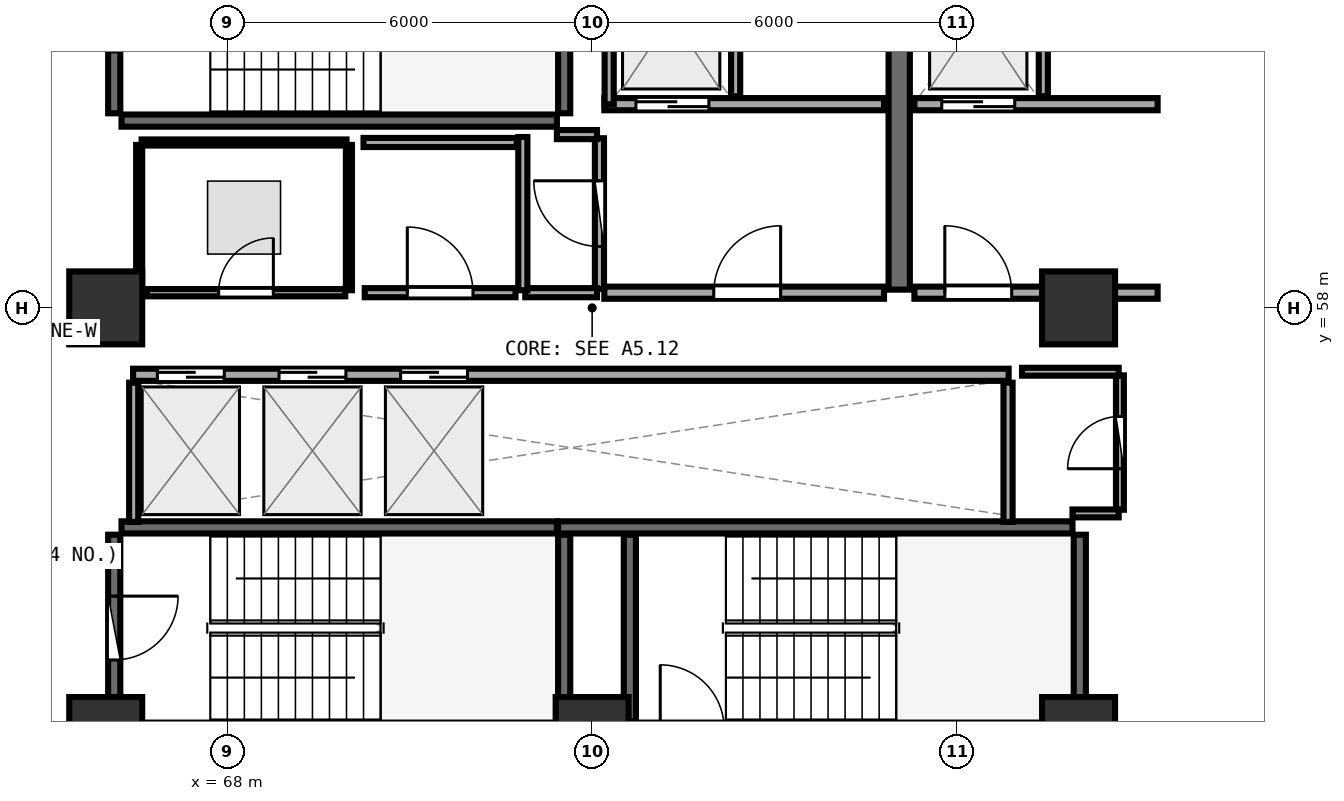
"""IFC4 building model, lengths in metres.
Left out: names, types, materials, properties, quantities, classifications, styles, units other than length and angle.
Written with IfcOpenShell. Run it as: python <this file> out.ifc"""

import sys

from ifc_helpers import new_model, si_unit, direction, frame, frame_2d, origin, origin_2d, place, context, subcontext, project, spatial, rectangle, extrude, element, fill, save


model = new_model("IFC4")
c1 = context("Model", 3, precision=1e-05, world=origin(), true_north=direction((0.0, 1.0)))
c2 = subcontext(c1, "Body", "Model", "MODEL_VIEW")
j1 = project(units=[si_unit("LENGTHUNIT", "METRE"), si_unit("PLANEANGLEUNIT", "RADIAN")], contexts=[c1])
p1 = place(None, origin())
s1 = spatial("IfcSite", under=j1, at=p1, CompositionType="ELEMENT")
p2 = place(p1, origin())
s2 = spatial("IfcBuilding", under=s1, at=p2, CompositionType="ELEMENT")
p3 = place(p2, frame((0.0, 0.0, 150.6)))
s3 = spatial("IfcBuildingStorey", under=s2, at=p3, CompositionType="ELEMENT", Elevation=150.6)
for number, where, z_axis, x_axis in (
    (1, (66.0, 51.0, 0.0), (0.0, 0.0, 1.0), (1.0, 0.0, 0.0)),
    (2, (74.0, 51.0, 0.0), (0.0, 0.0, 1.0), (1.0, 0.0, 0.0)),
    (3, (82.0, 51.0, 0.0), (0.0, 0.0, 1.0), (1.0, 0.0, 0.0)),
    (4, (82.0, 58.0, 0.0), (0.0, 0.0, 1.0), (1.0, 0.0, 0.0)),
    (5, (66.0, 58.0, 0.0), (0.0, 0.0, 1.0), (1.0, 0.0, 0.0)),
):
    element("IfcColumn", number, at=place(p3, frame(where, z_axis=z_axis, x_axis=x_axis)), inside=s3, PredefinedType="PILASTER", context=c2, shape_type="SweptSolid", body=[
        extrude(rectangle(XDim=1.2, YDim=1.2, at=origin_2d()), origin(), (0.0, 0.0, 1.0), 3.75),
    ])
p4 = place(p3, frame((66.26, 61.08, 0.0), z_axis=(0.0, 0.0, 1.0), x_axis=(1.0, 0.0, 0.0)))
e6 = element("IfcWall", 6, at=p4, inside=s3, PredefinedType="SHEAR", context=c2, shape_type="SweptSolid", body=[
    extrude(rectangle(XDim=7.16, YDim=0.2, at=frame_2d((3.58, 0.0))), origin(), (0.0, 0.0, 1.0), 3.49),
])
p5 = place(p3, frame((73.54, 61.2, 0.0), z_axis=(0.0, 0.0, 1.0), x_axis=(0.0, 1.0, 0.0)))
e7 = element("IfcWall", 7, at=p5, inside=s3, PredefinedType="SHEAR", context=c2, shape_type="SweptSolid", body=[
    extrude(rectangle(XDim=3.07, YDim=0.2, at=frame_2d((1.535, 0.0))), origin(), (0.0, 0.0, 1.0), 3.49),
])
p6 = place(p3, frame((66.14, 64.27, 0.0), z_axis=(0.0, 0.0, 1.0), x_axis=(0.0, -1.0, 0.0)))
e8 = element("IfcWall", 8, at=p6, inside=s3, PredefinedType="SHEAR", context=c2, shape_type="SweptSolid", body=[
    extrude(rectangle(XDim=3.07, YDim=0.2, at=frame_2d((1.535, 0.0))), origin(), (0.0, 0.0, 1.0), 3.49),
])
p7 = place(p6, frame((1.01, 0.0, 0.0)))
e9 = element("IfcOpeningElement", 9, at=p7, cuts=e8, PredefinedType="OPENING", context=c2, shape_type="SweptSolid", body=[
    extrude(rectangle(XDim=1.05, YDim=2.1, at=frame_2d((0.525, 1.05))), frame((0.0, 0.11, 0.0), z_axis=(0.0, -1.0, 0.0), x_axis=(1.0, 0.0, 0.0)), (0.0, 0.0, 1.0), 0.22),
])
p8 = place(p3, frame((82.02, 51.2, 0.0), z_axis=(0.0, 0.0, 1.0), x_axis=(0.0, 1.0, 0.0)))
e10 = element("IfcWall", 10, at=p8, inside=s3, PredefinedType="SHEAR", context=c2, shape_type="SweptSolid", body=[
    extrude(rectangle(XDim=3.07, YDim=0.2, at=frame_2d((1.535, 0.0))), origin(), (0.0, 0.0, 1.0), 3.49),
])
p9 = place(p3, frame((81.9, 54.39, 0.0), z_axis=(0.0, 0.0, 1.0), x_axis=(-1.0, 0.0, 0.0)))
e11 = element("IfcWall", 11, at=p9, inside=s3, PredefinedType="SHEAR", context=c2, shape_type="SweptSolid", body=[
    extrude(rectangle(XDim=8.46, YDim=0.2, at=frame_2d((4.23, 0.0))), origin(), (0.0, 0.0, 1.0), 3.49),
])
for number, where, z_axis, x_axis in (
    (12, (74.62, 54.27, 0.0), (0.0, 0.0, 1.0), (0.0, -1.0, 0.0)),
    (13, (73.54, 51.2, 0.0), (0.0, 0.0, 1.0), (0.0, 1.0, 0.0)),
):
    element("IfcWall", number, at=place(p3, frame(where, z_axis=z_axis, x_axis=x_axis)), inside=s3, PredefinedType="SHEAR", context=c2, shape_type="SweptSolid", body=[
        extrude(rectangle(XDim=3.07, YDim=0.2, at=frame_2d((1.535, 0.0))), origin(), (0.0, 0.0, 1.0), 3.49),
    ])
p10 = place(p3, frame((73.42, 54.39, 0.0), z_axis=(0.0, 0.0, 1.0), x_axis=(-1.0, 0.0, 0.0)))
e14 = element("IfcWall", 14, at=p10, inside=s3, PredefinedType="SHEAR", context=c2, shape_type="SweptSolid", body=[
    extrude(rectangle(XDim=7.16, YDim=0.2, at=frame_2d((3.58, 0.0))), origin(), (0.0, 0.0, 1.0), 3.49),
])
p11 = place(p3, frame((66.14, 54.27, 0.0), z_axis=(0.0, 0.0, 1.0), x_axis=(0.0, -1.0, 0.0)))
e15 = element("IfcWall", 15, at=p11, inside=s3, PredefinedType="SHEAR", context=c2, shape_type="SweptSolid", body=[
    extrude(rectangle(XDim=3.07, YDim=0.2, at=frame_2d((1.535, 0.0))), origin(), (0.0, 0.0, 1.0), 3.49),
])
p12 = place(p11, frame((1.01, 0.0, 0.0)))
e16 = element("IfcOpeningElement", 16, at=p12, cuts=e15, PredefinedType="OPENING", context=c2, shape_type="SweptSolid", body=[
    extrude(rectangle(XDim=1.05, YDim=2.1, at=frame_2d((0.525, 1.05))), frame((0.0, 0.11, 0.0), z_axis=(0.0, -1.0, 0.0), x_axis=(1.0, 0.0, 0.0)), (0.0, 0.0, 1.0), 0.22),
])
p13 = place(p3, frame((79.05, 58.3, 0.0), z_axis=(0.0, 0.0, 1.0), x_axis=(0.0, 1.0, 0.0)))
e17 = element("IfcWall", 17, at=p13, inside=s3, PredefinedType="SHEAR", context=c2, shape_type="SweptSolid", body=[
    extrude(rectangle(XDim=6.3, YDim=0.35, at=frame_2d((3.15, 0.0))), origin(), (0.0, 0.0, 1.0), 3.49),
])
p14 = place(p3, frame((74.2, 61.35, 0.0), z_axis=(0.0, 0.0, 1.0), x_axis=(1.0, 0.0, 0.0)))
e18 = element("IfcWall", 18, at=p14, inside=s3, PredefinedType="SOLIDWALL", context=c2, shape_type="SweptSolid", body=[
    extrude(rectangle(XDim=4.6, YDim=0.2, at=frame_2d((2.3, 0.0))), origin(), (0.0, 0.0, 1.0), 3.48),
])
p15 = place(p14, frame((0.52, 0.0, 0.0)))
e19 = element("IfcOpeningElement", 19, at=p15, cuts=e18, PredefinedType="OPENING", context=c2, shape_type="SweptSolid", body=[
    extrude(rectangle(XDim=1.2, YDim=2.15, at=frame_2d((0.6, 1.075))), frame((0.0, 0.11, 0.0), z_axis=(0.0, -1.0, 0.0), x_axis=(1.0, 0.0, 0.0)), (0.0, 0.0, 1.0), 0.22),
])
p16 = place(p3, frame((74.28, 61.35, 0.0), z_axis=(0.0, 0.0, 1.0), x_axis=(0.0, 1.0, 0.0)))
e20 = element("IfcWall", 20, at=p16, inside=s3, PredefinedType="PARTITIONING", context=c2, shape_type="SweptSolid", body=[
    extrude(rectangle(XDim=2.97, YDim=0.15, at=frame_2d((1.485, 0.0))), origin(), (0.0, 0.0, 1.0), 3.48),
])
p17 = place(p3, frame((76.36, 61.48, 0.0), z_axis=(0.0, 0.0, 1.0), x_axis=(0.0, 1.0, 0.0)))
e21 = element("IfcWall", 21, at=p17, inside=s3, PredefinedType="PARTITIONING", context=c2, shape_type="SweptSolid", body=[
    extrude(rectangle(XDim=2.84, YDim=0.15, at=frame_2d((1.42, 0.0))), origin(), (0.0, 0.0, 1.0), 3.48),
])
p18 = place(p3, frame((79.3, 61.35, 0.0), z_axis=(0.0, 0.0, 1.0), x_axis=(1.0, 0.0, 0.0)))
e22 = element("IfcWall", 22, at=p18, inside=s3, PredefinedType="SOLIDWALL", context=c2, shape_type="SweptSolid", body=[
    extrude(rectangle(XDim=4.0, YDim=0.2, at=frame_2d((2.0, 0.0))), origin(), (0.0, 0.0, 1.0), 2.775),
])
p19 = place(p18, frame((0.45, 0.0, 0.0)))
e23 = element("IfcOpeningElement", 23, at=p19, cuts=e22, PredefinedType="OPENING", context=c2, shape_type="SweptSolid", body=[
    extrude(rectangle(XDim=1.2, YDim=2.15, at=frame_2d((0.6, 1.075))), frame((0.0, 0.11, 0.0), z_axis=(0.0, -1.0, 0.0), x_axis=(1.0, 0.0, 0.0)), (0.0, 0.0, 1.0), 0.22),
])
p20 = place(p3, frame((81.42, 61.48, 0.0), z_axis=(0.0, 0.0, 1.0), x_axis=(0.0, 1.0, 0.0)))
e24 = element("IfcWall", 24, at=p20, inside=s3, PredefinedType="PARTITIONING", context=c2, shape_type="SweptSolid", body=[
    extrude(rectangle(XDim=2.84, YDim=0.15, at=frame_2d((1.42, 0.0))), origin(), (0.0, 0.0, 1.0), 3.48),
])
p21 = place(p3, frame((74.2, 58.25, 0.0), z_axis=(0.0, 0.0, 1.0), x_axis=(1.0, 0.0, 0.0)))
e25 = element("IfcWall", 25, at=p21, inside=s3, PredefinedType="SOLIDWALL", context=c2, shape_type="SweptSolid", body=[
    extrude(rectangle(XDim=4.6, YDim=0.2, at=frame_2d((2.3, 0.0))), origin(), (0.0, 0.0, 1.0), 3.48),
])
p22 = place(p21, frame((1.8, 0.0, 0.0)))
e26 = element("IfcOpeningElement", 26, at=p22, cuts=e25, PredefinedType="OPENING", context=c2, shape_type="SweptSolid", body=[
    extrude(rectangle(XDim=1.1, YDim=2.1, at=frame_2d((0.55, 1.05))), frame((0.0, 0.11, 0.0), z_axis=(0.0, -1.0, 0.0), x_axis=(1.0, 0.0, 0.0)), (0.0, 0.0, 1.0), 0.22),
])
p23 = place(p3, frame((79.3, 58.25, 0.0), z_axis=(0.0, 0.0, 1.0), x_axis=(1.0, 0.0, 0.0)))
e27 = element("IfcWall", 27, at=p23, inside=s3, PredefinedType="SOLIDWALL", context=c2, shape_type="SweptSolid", body=[
    extrude(rectangle(XDim=4.0, YDim=0.2, at=frame_2d((2.0, 0.0))), origin(), (0.0, 0.0, 1.0), 2.775),
])
p24 = place(p23, frame((0.5, 0.0, 0.0)))
e28 = element("IfcOpeningElement", 28, at=p24, cuts=e27, PredefinedType="OPENING", context=c2, shape_type="SweptSolid", body=[
    extrude(rectangle(XDim=1.1, YDim=2.1, at=frame_2d((0.55, 1.05))), frame((0.0, 0.11, 0.0), z_axis=(0.0, -1.0, 0.0), x_axis=(1.0, 0.0, 0.0)), (0.0, 0.0, 1.0), 0.22),
])
p25 = place(p3, frame((66.45, 56.9, 0.0), z_axis=(0.0, 0.0, 1.0), x_axis=(1.0, 0.0, 0.0)))
e29 = element("IfcWall", 29, at=p25, inside=s3, PredefinedType="SOLIDWALL", context=c2, shape_type="SweptSolid", body=[
    extrude(rectangle(XDim=14.4, YDim=0.2, at=frame_2d((7.2, 0.0))), origin(), (0.0, 0.0, 1.0), 3.48),
])
p26 = place(p25, frame((0.4, 0.0, 0.0)))
e30 = element("IfcOpeningElement", 30, at=p26, cuts=e29, PredefinedType="OPENING", context=c2, shape_type="SweptSolid", body=[
    extrude(rectangle(XDim=1.1, YDim=2.1, at=frame_2d((0.55, 1.05))), frame((0.0, 0.11, 0.0), z_axis=(0.0, -1.0, 0.0), x_axis=(1.0, 0.0, 0.0)), (0.0, 0.0, 1.0), 0.22),
])
p27 = place(p25, frame((2.4, 0.0, 0.0)))
e31 = element("IfcOpeningElement", 31, at=p27, cuts=e29, PredefinedType="OPENING", context=c2, shape_type="SweptSolid", body=[
    extrude(rectangle(XDim=1.1, YDim=2.1, at=frame_2d((0.55, 1.05))), frame((0.0, 0.11, 0.0), z_axis=(0.0, -1.0, 0.0), x_axis=(1.0, 0.0, 0.0)), (0.0, 0.0, 1.0), 0.22),
])
p28 = place(p25, frame((4.4, 0.0, 0.0)))
e32 = element("IfcOpeningElement", 32, at=p28, cuts=e29, PredefinedType="OPENING", context=c2, shape_type="SweptSolid", body=[
    extrude(rectangle(XDim=1.1, YDim=2.1, at=frame_2d((0.55, 1.05))), frame((0.0, 0.11, 0.0), z_axis=(0.0, -1.0, 0.0), x_axis=(1.0, 0.0, 0.0)), (0.0, 0.0, 1.0), 0.22),
])
for number, where, z_axis, x_axis in (
    (33, (66.46, 54.48, 0.0), (0.0, 0.0, 1.0), (0.0, 1.0, 0.0)),
    (34, (80.84, 54.48, 0.0), (0.0, 0.0, 1.0), (0.0, 1.0, 0.0)),
):
    element("IfcWall", number, at=place(p3, frame(where, z_axis=z_axis, x_axis=x_axis)), inside=s3, PredefinedType="PARTITIONING", context=c2, shape_type="SweptSolid", body=[
        extrude(rectangle(XDim=2.29, YDim=0.15, at=frame_2d((1.145, 0.0))), origin(), (0.0, 0.0, 1.0), 3.48),
    ])
p29 = place(p3, frame((74.12, 58.31, 0.0), z_axis=(0.0, 0.0, 1.0), x_axis=(0.0, 1.0, 0.0)))
e35 = element("IfcWall", 35, at=p29, inside=s3, PredefinedType="PARTITIONING", context=c2, shape_type="SweptSolid", body=[
    extrude(rectangle(XDim=2.48, YDim=0.15, at=frame_2d((1.24, 0.0))), origin(), (0.0, 0.0, 1.0), 3.48),
])
p30 = place(p29, frame((0.7, 0.0, 0.0)))
e36 = element("IfcOpeningElement", 36, at=p30, cuts=e35, PredefinedType="OPENING", context=c2, shape_type="SweptSolid", body=[
    extrude(rectangle(XDim=1.08, YDim=2.1, at=frame_2d((0.54, 1.05))), frame((0.0, 0.085, 0.0), z_axis=(0.0, -1.0, 0.0), x_axis=(1.0, 0.0, 0.0)), (0.0, 0.0, 1.0), 0.17),
])
p31 = place(p3, frame((82.68, 54.68, 0.0), z_axis=(0.0, 0.0, 1.0), x_axis=(0.0, 1.0, 0.0)))
e37 = element("IfcWall", 37, at=p31, inside=s3, PredefinedType="PLUMBINGWALL", context=c2, shape_type="SweptSolid", body=[
    extrude(rectangle(XDim=2.21, YDim=0.13, at=frame_2d((1.105, 0.0))), origin(), (0.0, 0.0, 1.0), 3.48),
])
p32 = place(p31, frame((0.675, 0.0, 0.0)))
e38 = element("IfcOpeningElement", 38, at=p32, cuts=e37, PredefinedType="OPENING", context=c2, shape_type="SweptSolid", body=[
    extrude(rectangle(XDim=0.86, YDim=2.05, at=frame_2d((0.43, 1.025))), frame((0.0, 0.075, 0.0), z_axis=(0.0, -1.0, 0.0), x_axis=(1.0, 0.0, 0.0)), (0.0, 0.0, 1.0), 0.15),
])
p33 = place(p3, frame((66.675, 58.25, 0.0), z_axis=(0.0, 0.0, 1.0), x_axis=(1.0, 0.0, 0.0)))
e39 = element("IfcWall", 39, at=p33, inside=s3, PredefinedType="PARTITIONING", context=c2, shape_type="SweptSolid", body=[
    extrude(rectangle(XDim=3.265, YDim=0.12, at=frame_2d((1.632, 0.0))), origin(), (0.0, 0.0, 1.0), 3.48),
])
p34 = place(p33, frame((1.182, 0.0, 0.0)))
e40 = element("IfcOpeningElement", 40, at=p34, cuts=e39, PredefinedType="OPENING", context=c2, shape_type="SweptSolid", body=[
    extrude(rectangle(XDim=0.9, YDim=2.08, at=frame_2d((0.45, 1.04))), frame((0.0, 0.07, 0.0), z_axis=(0.0, -1.0, 0.0), x_axis=(1.0, 0.0, 0.0)), (0.0, 0.0, 1.0), 0.14),
])
p35 = place(p3, frame((70.26, 58.25, 0.0), z_axis=(0.0, 0.0, 1.0), x_axis=(1.0, 0.0, 0.0)))
e41 = element("IfcWall", 41, at=p35, inside=s3, PredefinedType="PARTITIONING", context=c2, shape_type="SweptSolid", body=[
    extrude(rectangle(XDim=2.48, YDim=0.15, at=frame_2d((1.24, 0.0))), origin(), (0.0, 0.0, 1.0), 3.48),
])
p36 = place(p35, frame((0.7, 0.0, 0.0)))
e42 = element("IfcOpeningElement", 42, at=p36, cuts=e41, PredefinedType="OPENING", context=c2, shape_type="SweptSolid", body=[
    extrude(rectangle(XDim=1.08, YDim=2.1, at=frame_2d((0.54, 1.05))), frame((0.0, 0.085, 0.0), z_axis=(0.0, -1.0, 0.0), x_axis=(1.0, 0.0, 0.0)), (0.0, 0.0, 1.0), 0.17),
])
p37 = place(p3, frame((72.9, 58.25, 0.0), z_axis=(0.0, 0.0, 1.0), x_axis=(1.0, 0.0, 0.0)))
e43 = element("IfcWall", 43, at=p37, inside=s3, PredefinedType="PARTITIONING", context=c2, shape_type="SweptSolid", body=[
    extrude(rectangle(XDim=1.18, YDim=0.15, at=frame_2d((0.59, 0.0))), origin(), (0.0, 0.0, 1.0), 3.48),
])
p38 = place(p3, frame((74.08, 60.85, 0.0), z_axis=(0.0, 0.0, 1.0), x_axis=(-1.0, 0.0, 0.0)))
e44 = element("IfcWall", 44, at=p38, inside=s3, PredefinedType="PARTITIONING", context=c2, shape_type="SweptSolid", body=[
    extrude(rectangle(XDim=0.66, YDim=0.15, at=frame_2d((0.33, 0.0))), origin(), (0.0, 0.0, 1.0), 3.48),
])
p39 = place(p3, frame((72.86, 60.81, 0.0), z_axis=(0.0, 0.0, 1.0), x_axis=(0.0, -1.0, 0.0)))
e45 = element("IfcWall", 45, at=p39, inside=s3, PredefinedType="PARTITIONING", context=c2, shape_type="SweptSolid", body=[
    extrude(rectangle(XDim=2.52, YDim=0.15, at=frame_2d((1.26, 0.0))), origin(), (0.0, 0.0, 1.0), 3.48),
])
p40 = place(p3, frame((81.9, 54.62, 0.0), z_axis=(0.0, 0.0, 1.0), x_axis=(1.0, 0.0, 0.0)))
e46 = element("IfcWall", 46, at=p40, inside=s3, PredefinedType="PLUMBINGWALL", context=c2, shape_type="SweptSolid", body=[
    extrude(rectangle(XDim=0.76, YDim=0.13, at=frame_2d((0.38, 0.0))), origin(), (0.0, 0.0, 1.0), 2.775),
])
p41 = place(p3, frame((82.66, 56.95, 0.0), z_axis=(0.0, 0.0, 1.0), x_axis=(-1.0, 0.0, 0.0)))
e47 = element("IfcWall", 47, at=p41, inside=s3, PredefinedType="PLUMBINGWALL", context=c2, shape_type="SweptSolid", body=[
    extrude(rectangle(XDim=1.59, YDim=0.13, at=frame_2d((0.795, 0.0))), origin(), (0.0, 0.0, 1.0), 2.775),
])
p42 = place(p3, frame((70.0, 58.29, 0.0), z_axis=(0.0, 0.0, 1.0), x_axis=(0.0, 1.0, 0.0)))
e48 = element("IfcWall", 48, at=p42, inside=s3, PredefinedType="PARTITIONING", context=c2, shape_type="SweptSolid", body=[
    extrude(rectangle(XDim=2.39, YDim=0.1, at=frame_2d((1.195, 0.0))), origin(), (0.0, 0.0, 1.0), 3.48),
])
p43 = place(p3, frame((69.96, 60.72, 0.0), z_axis=(0.0, 0.0, 1.0), x_axis=(-1.0, 0.0, 0.0)))
e49 = element("IfcWall", 49, at=p43, inside=s3, PredefinedType="PARTITIONING", context=c2, shape_type="SweptSolid", body=[
    extrude(rectangle(XDim=3.37, YDim=0.1, at=frame_2d((1.685, 0.0))), origin(), (0.0, 0.0, 1.0), 3.48),
])
p44 = place(p3, frame((66.55, 60.68, 0.0), z_axis=(0.0, 0.0, 1.0), x_axis=(0.0, -1.0, 0.0)))
e50 = element("IfcWall", 50, at=p44, inside=s3, PredefinedType="PARTITIONING", context=c2, shape_type="SweptSolid", body=[
    extrude(rectangle(XDim=2.383, YDim=0.1, at=frame_2d((1.191, 0.0))), origin(), (0.0, 0.0, 1.0), 3.48),
])
p45 = place(p3, frame((72.76, 60.72, 0.0), z_axis=(0.0, 0.0, 1.0), x_axis=(-1.0, 0.0, 0.0)))
e51 = element("IfcWall", 51, at=p45, inside=s3, PredefinedType="PARTITIONING", context=c2, shape_type="SweptSolid", body=[
    extrude(rectangle(XDim=2.52, YDim=0.15, at=frame_2d((1.26, 0.0))), origin(), (0.0, 0.0, 1.0), 3.48),
])
p46 = place(p3, frame((84.891, 50.352, 0.0), z_axis=(0.0, 0.0, 1.0), x_axis=(0.481680787808, 0.876346745676, 0.0)))
e52 = element("IfcWall", 52, at=p46, inside=s3, PredefinedType="PARTITIONING", context=c2, shape_type="SweptSolid", body=[
    extrude(rectangle(XDim=5.16, YDim=0.1, at=frame_2d((2.58, 0.0))), origin(), (0.0, 0.0, 1.0), 2.975),
])
p47 = place(p3, frame((87.032, 62.129, 0.0), z_axis=(0.0, 0.0, 1.0), x_axis=(-0.619933209612, 0.784654583636, 0.0)))
e53 = element("IfcWall", 53, at=p47, inside=s3, PredefinedType="PARTITIONING", context=c2, shape_type="SweptSolid", body=[
    extrude(rectangle(XDim=7.095, YDim=0.1, at=frame_2d((3.547, 0.0))), origin(), (0.0, 0.0, 1.0), 2.975),
])
p48 = place(p12, origin())
e54 = element("IfcDoor", 54, at=p48, inside=s3, OperationType="SINGLE_SWING_LEFT", PredefinedType="DOOR", context=c2, shape_type="SweptSolid", body=[
    extrude(rectangle(XDim=1.05, YDim=2.1, at=frame_2d((0.525, 1.05))), frame((0.0, 0.025, 0.0), z_axis=(0.0, -1.0, 0.0), x_axis=(1.0, 0.0, 0.0)), (0.0, 0.0, 1.0), 0.05),
])
fill(e16, e54)
p49 = place(p15, origin())
e55 = element("IfcDoor", 55, at=p49, inside=s3, OperationType="DOUBLE_DOOR_SLIDING", PredefinedType="DOOR", context=c2, shape_type="SweptSolid", body=[
    extrude(rectangle(XDim=1.2, YDim=2.15, at=frame_2d((0.6, 1.075))), frame((0.0, 0.025, 0.0), z_axis=(0.0, -1.0, 0.0), x_axis=(1.0, 0.0, 0.0)), (0.0, 0.0, 1.0), 0.05),
])
fill(e19, e55)
p50 = place(p19, origin())
e56 = element("IfcDoor", 56, at=p50, inside=s3, OperationType="DOUBLE_DOOR_SLIDING", PredefinedType="DOOR", context=c2, shape_type="SweptSolid", body=[
    extrude(rectangle(XDim=1.2, YDim=2.15, at=frame_2d((0.6, 1.075))), frame((0.0, 0.025, 0.0), z_axis=(0.0, -1.0, 0.0), x_axis=(1.0, 0.0, 0.0)), (0.0, 0.0, 1.0), 0.05),
])
fill(e23, e56)
p51 = place(p22, frame((1.1, 0.0, 0.0), z_axis=(0.0, 0.0, 1.0), x_axis=(-1.0, 0.0, 0.0)))
e57 = element("IfcDoor", 57, at=p51, inside=s3, OperationType="SINGLE_SWING_LEFT", PredefinedType="DOOR", context=c2, shape_type="SweptSolid", body=[
    extrude(rectangle(XDim=1.1, YDim=2.1, at=frame_2d((0.55, 1.05))), frame((0.0, 0.025, 0.0), z_axis=(0.0, -1.0, 0.0), x_axis=(1.0, 0.0, 0.0)), (0.0, 0.0, 1.0), 0.05),
])
fill(e26, e57)
p52 = place(p24, frame((1.1, 0.0, 0.0), z_axis=(0.0, 0.0, 1.0), x_axis=(-1.0, 0.0, 0.0)))
e58 = element("IfcDoor", 58, at=p52, inside=s3, OperationType="SINGLE_SWING_RIGHT", PredefinedType="DOOR", context=c2, shape_type="SweptSolid", body=[
    extrude(rectangle(XDim=1.1, YDim=2.1, at=frame_2d((0.55, 1.05))), frame((0.0, 0.025, 0.0), z_axis=(0.0, -1.0, 0.0), x_axis=(1.0, 0.0, 0.0)), (0.0, 0.0, 1.0), 0.05),
])
fill(e28, e58)
p53 = place(p26, origin())
e59 = element("IfcDoor", 59, at=p53, inside=s3, OperationType="DOUBLE_DOOR_SLIDING", PredefinedType="DOOR", context=c2, shape_type="SweptSolid", body=[
    extrude(rectangle(XDim=1.1, YDim=2.1, at=frame_2d((0.55, 1.05))), frame((0.0, 0.025, 0.0), z_axis=(0.0, -1.0, 0.0), x_axis=(1.0, 0.0, 0.0)), (0.0, 0.0, 1.0), 0.05),
])
fill(e30, e59)
p54 = place(p27, origin())
e60 = element("IfcDoor", 60, at=p54, inside=s3, OperationType="DOUBLE_DOOR_SLIDING", PredefinedType="DOOR", context=c2, shape_type="SweptSolid", body=[
    extrude(rectangle(XDim=1.1, YDim=2.1, at=frame_2d((0.55, 1.05))), frame((0.0, 0.025, 0.0), z_axis=(0.0, -1.0, 0.0), x_axis=(1.0, 0.0, 0.0)), (0.0, 0.0, 1.0), 0.05),
])
fill(e31, e60)
p55 = place(p28, origin())
e61 = element("IfcDoor", 61, at=p55, inside=s3, OperationType="DOUBLE_DOOR_SLIDING", PredefinedType="DOOR", context=c2, shape_type="SweptSolid", body=[
    extrude(rectangle(XDim=1.1, YDim=2.1, at=frame_2d((0.55, 1.05))), frame((0.0, 0.025, 0.0), z_axis=(0.0, -1.0, 0.0), x_axis=(1.0, 0.0, 0.0)), (0.0, 0.0, 1.0), 0.05),
])
fill(e32, e61)
p56 = place(p30, origin())
e62 = element("IfcDoor", 62, at=p56, inside=s3, OperationType="SINGLE_SWING_RIGHT", PredefinedType="DOOR", context=c2, shape_type="SweptSolid", body=[
    extrude(rectangle(XDim=1.08, YDim=2.1, at=frame_2d((0.54, 1.05))), frame((0.0, 0.025, 0.0), z_axis=(0.0, -1.0, 0.0), x_axis=(1.0, 0.0, 0.0)), (0.0, 0.0, 1.0), 0.05),
])
fill(e36, e62)
p57 = place(p32, origin())
e63 = element("IfcDoor", 63, at=p57, inside=s3, OperationType="SINGLE_SWING_LEFT", PredefinedType="DOOR", context=c2, shape_type="SweptSolid", body=[
    extrude(rectangle(XDim=0.86, YDim=2.05, at=frame_2d((0.43, 1.025))), frame((0.0, 0.025, 0.0), z_axis=(0.0, -1.0, 0.0), x_axis=(1.0, 0.0, 0.0)), (0.0, 0.0, 1.0), 0.05),
])
fill(e38, e63)
p58 = place(p34, origin())
e64 = element("IfcDoor", 64, at=p58, inside=s3, OperationType="SINGLE_SWING_RIGHT", PredefinedType="DOOR", context=c2, shape_type="SweptSolid", body=[
    extrude(rectangle(XDim=0.9, YDim=2.08, at=frame_2d((0.45, 1.04))), frame((0.0, 0.025, 0.0), z_axis=(0.0, -1.0, 0.0), x_axis=(1.0, 0.0, 0.0)), (0.0, 0.0, 1.0), 0.05),
])
fill(e40, e64)
p59 = place(p36, origin())
e65 = element("IfcDoor", 65, at=p59, inside=s3, OperationType="SINGLE_SWING_LEFT", PredefinedType="DOOR", context=c2, shape_type="SweptSolid", body=[
    extrude(rectangle(XDim=1.08, YDim=2.1, at=frame_2d((0.54, 1.05))), frame((0.0, 0.025, 0.0), z_axis=(0.0, -1.0, 0.0), x_axis=(1.0, 0.0, 0.0)), (0.0, 0.0, 1.0), 0.05),
])
fill(e42, e65)
save(model, sys.argv[1])
